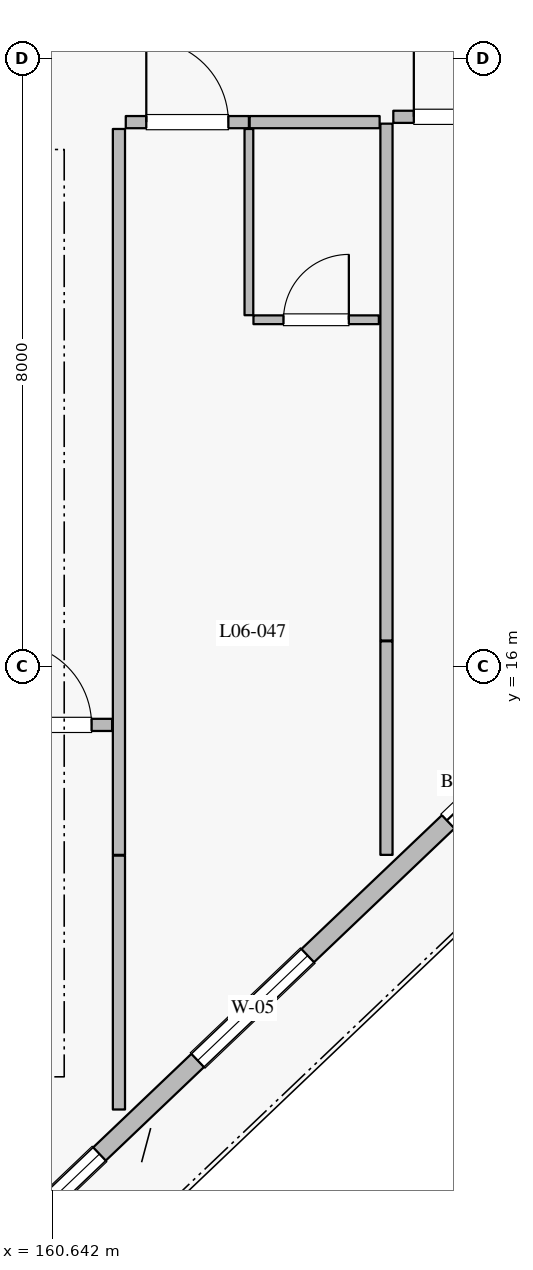
"""IFC4 building model, lengths in metres.
Left out: names, types, materials, properties, quantities, classifications, styles, units other than length and angle.
Written with IfcOpenShell. Run it as: python <this file> out.ifc"""

import sys

from ifc_helpers import new_model, si_unit, direction, frame, frame_2d, origin, place, context, subcontext, project, spatial, rectangle, extrude, element, fill, save


model = new_model("IFC4")
c1 = context("Model", 3, precision=1e-05, world=origin(), true_north=direction((0.0, 1.0)))
c2 = subcontext(c1, "Body", "Model", "MODEL_VIEW")
j1 = project(units=[si_unit("LENGTHUNIT", "METRE"), si_unit("PLANEANGLEUNIT", "RADIAN")], contexts=[c1])
p1 = place(None, origin())
s1 = spatial("IfcSite", under=j1, at=p1, CompositionType="ELEMENT")
p2 = place(p1, origin())
s2 = spatial("IfcBuilding", under=s1, at=p2, CompositionType="ELEMENT")
p3 = place(p2, frame((0.0, 0.0, 28.8)))
s3 = spatial("IfcBuildingStorey", under=s2, at=p3, CompositionType="ELEMENT", Elevation=28.8)
p4 = place(p3, frame((167.65, 15.667, 0.0), z_axis=(0.0, 0.0, 1.0), x_axis=(-0.724105170588, -0.689689569247, 0.0)))
e1 = element("IfcWall", 1, at=p4, inside=s3, PredefinedType="SOLIDWALL", context=c2, shape_type="SweptSolid", body=[
    extrude(rectangle(XDim=10.634, YDim=0.24, at=frame_2d((5.317, 0.0))), origin(), (0.0, 0.0, 1.0), 2.93),
])
p5 = place(p4, frame((0.983, 0.0, 0.0)))
e2 = element("IfcOpeningElement", 2, at=p5, cuts=e1, PredefinedType="OPENING", context=c2, shape_type="SweptSolid", body=[
    extrude(rectangle(XDim=1.5, YDim=2.25, at=frame_2d((0.75, 1.125))), frame((0.0, 0.13, 0.0), z_axis=(0.0, -1.0, 0.0), x_axis=(1.0, 0.0, 0.0)), (0.0, 0.0, 1.0), 0.26),
])
p6 = place(p4, frame((5.035, 0.0, 0.8)))
e3 = element("IfcOpeningElement", 3, at=p6, cuts=e1, PredefinedType="OPENING", context=c2, shape_type="SweptSolid", body=[
    extrude(rectangle(XDim=2.0, YDim=1.75, at=frame_2d((1.0, 0.875))), frame((0.0, 0.13, 0.0), z_axis=(0.0, -1.0, 0.0), x_axis=(1.0, 0.0, 0.0)), (0.0, 0.0, 1.0), 0.26),
])
p7 = place(p4, frame((8.819, 0.0, 0.8)))
e4 = element("IfcOpeningElement", 4, at=p7, cuts=e1, PredefinedType="OPENING", context=c2, shape_type="SweptSolid", body=[
    extrude(rectangle(XDim=1.6, YDim=1.6, at=frame_2d((0.8, 0.8))), frame((0.0, 0.13, 0.0), z_axis=(0.0, -1.0, 0.0), x_axis=(1.0, 0.0, 0.0)), (0.0, 0.0, 1.0), 0.26),
])
p8 = place(p3, frame((159.81, 15.23, 0.0), z_axis=(0.0, 0.0, 1.0), x_axis=(1.0, 0.0, 0.0)))
e5 = element("IfcWall", 5, at=p8, inside=s3, PredefinedType="PARTITIONING", context=c2, shape_type="SweptSolid", body=[
    extrude(rectangle(XDim=1.62, YDim=0.16, at=frame_2d((0.81, 0.0))), origin(), (0.0, 0.0, 1.0), 3.365),
])
p9 = place(p8, frame((0.27, 0.0, 0.0)))
e6 = element("IfcOpeningElement", 6, at=p9, cuts=e5, PredefinedType="OPENING", context=c2, shape_type="SweptSolid", body=[
    extrude(rectangle(XDim=1.08, YDim=2.3, at=frame_2d((0.54, 1.15))), frame((0.0, 0.09, 0.0), z_axis=(0.0, -1.0, 0.0), x_axis=(1.0, 0.0, 0.0)), (0.0, 0.0, 1.0), 0.18),
])
p10 = place(p3, frame((161.52, 10.17, 0.0), z_axis=(0.0, 0.0, 1.0), x_axis=(0.0, 1.0, 0.0)))
e7 = element("IfcWall", 7, at=p10, inside=s3, PredefinedType="PARTITIONING", context=c2, shape_type="SweptSolid", body=[
    extrude(rectangle(XDim=3.34, YDim=0.16, at=frame_2d((1.67, 0.0))), origin(), (0.0, 0.0, 1.0), 3.365),
])
p11 = place(p3, frame((161.61, 23.16, 0.0), z_axis=(0.0, 0.0, 1.0), x_axis=(1.0, 0.0, 0.0)))
e8 = element("IfcWall", 8, at=p11, inside=s3, PredefinedType="PARTITIONING", context=c2, shape_type="SweptSolid", body=[
    extrude(rectangle(XDim=1.62, YDim=0.16, at=frame_2d((0.81, 0.0))), origin(), (0.0, 0.0, 1.0), 3.365),
])
p12 = place(p11, frame((0.27, 0.0, 0.0)))
e9 = element("IfcOpeningElement", 9, at=p12, cuts=e8, PredefinedType="OPENING", context=c2, shape_type="SweptSolid", body=[
    extrude(rectangle(XDim=1.08, YDim=2.3, at=frame_2d((0.54, 1.15))), frame((0.0, 0.09, 0.0), z_axis=(0.0, -1.0, 0.0), x_axis=(1.0, 0.0, 0.0)), (0.0, 0.0, 1.0), 0.18),
])
p13 = place(p3, frame((163.24, 23.16, 0.0), z_axis=(0.0, 0.0, 1.0), x_axis=(1.0, 0.0, 0.0)))
e10 = element("IfcWall", 10, at=p13, inside=s3, PredefinedType="PARTITIONING", context=c2, shape_type="SweptSolid", body=[
    extrude(rectangle(XDim=1.71, YDim=0.16, at=frame_2d((0.855, 0.0))), origin(), (0.0, 0.0, 1.0), 3.365),
])
p14 = place(p3, frame((163.23, 20.62, 0.0), z_axis=(0.0, 0.0, 1.0), x_axis=(0.0, 1.0, 0.0)))
e11 = element("IfcWall", 11, at=p14, inside=s3, PredefinedType="PARTITIONING", context=c2, shape_type="SweptSolid", body=[
    extrude(rectangle(XDim=2.45, YDim=0.115, at=frame_2d((1.225, 0.0))), origin(), (0.0, 0.0, 1.0), 3.365),
])
p15 = place(p3, frame((163.29, 20.56, 0.0), z_axis=(0.0, 0.0, 1.0), x_axis=(1.0, 0.0, 0.0)))
e12 = element("IfcWall", 12, at=p15, inside=s3, PredefinedType="PARTITIONING", context=c2, shape_type="SweptSolid", body=[
    extrude(rectangle(XDim=1.65, YDim=0.115, at=frame_2d((0.825, 0.0))), origin(), (0.0, 0.0, 1.0), 3.365),
])
p16 = place(p15, frame((0.395, 0.0, 0.0)))
e13 = element("IfcOpeningElement", 13, at=p16, cuts=e12, PredefinedType="OPENING", context=c2, shape_type="SweptSolid", body=[
    extrude(rectangle(XDim=0.86, YDim=2.12, at=frame_2d((0.43, 1.06))), frame((0.0, 0.067, 0.0), z_axis=(0.0, -1.0, 0.0), x_axis=(1.0, 0.0, 0.0)), (0.0, 0.0, 1.0), 0.135),
])
p17 = place(p3, frame((161.52, 13.52, 0.0), z_axis=(0.0, 0.0, 1.0), x_axis=(0.0, 1.0, 0.0)))
e14 = element("IfcWall", 14, at=p17, inside=s3, PredefinedType="PARTITIONING", context=c2, shape_type="SweptSolid", body=[
    extrude(rectangle(XDim=9.55, YDim=0.16, at=frame_2d((4.775, 0.0))), origin(), (0.0, 0.0, 1.0), 3.365),
])
p18 = place(p3, frame((165.04, 13.52, 0.0), z_axis=(0.0, 0.0, 1.0), x_axis=(0.0, 1.0, 0.0)))
e15 = element("IfcWall", 15, at=p18, inside=s3, PredefinedType="PARTITIONING", context=c2, shape_type="SweptSolid", body=[
    extrude(rectangle(XDim=2.81, YDim=0.16, at=frame_2d((1.405, 0.0))), origin(), (0.0, 0.0, 1.0), 3.365),
])
p19 = place(p3, frame((165.13, 23.23, 0.0), z_axis=(0.0, 0.0, 1.0), x_axis=(1.0, 0.0, 0.0)))
e16 = element("IfcWall", 16, at=p19, inside=s3, PredefinedType="PARTITIONING", context=c2, shape_type="SweptSolid", body=[
    extrude(rectangle(XDim=1.62, YDim=0.16, at=frame_2d((0.81, 0.0))), origin(), (0.0, 0.0, 1.0), 3.365),
])
p20 = place(p19, frame((0.27, 0.0, 0.0)))
e17 = element("IfcOpeningElement", 17, at=p20, cuts=e16, PredefinedType="OPENING", context=c2, shape_type="SweptSolid", body=[
    extrude(rectangle(XDim=1.08, YDim=2.3, at=frame_2d((0.54, 1.15))), frame((0.0, 0.09, 0.0), z_axis=(0.0, -1.0, 0.0), x_axis=(1.0, 0.0, 0.0)), (0.0, 0.0, 1.0), 0.18),
])
p21 = place(p3, frame((165.04, 16.34, 0.0), z_axis=(0.0, 0.0, 1.0), x_axis=(0.0, 1.0, 0.0)))
e18 = element("IfcWall", 18, at=p21, inside=s3, PredefinedType="PARTITIONING", context=c2, shape_type="SweptSolid", body=[
    extrude(rectangle(XDim=6.8, YDim=0.16, at=frame_2d((3.4, 0.0))), origin(), (0.0, 0.0, 1.0), 3.365),
])
p22 = place(p5, origin())
e19 = element("IfcDoor", 19, at=p22, inside=s3, OperationType="SLIDING_TO_LEFT", PredefinedType="DOOR", context=c2, shape_type="SweptSolid", body=[
    extrude(rectangle(XDim=1.5, YDim=2.25, at=frame_2d((0.75, 1.125))), frame((0.0, 0.025, 0.0), z_axis=(0.0, -1.0, 0.0), x_axis=(1.0, 0.0, 0.0)), (0.0, 0.0, 1.0), 0.05),
])
fill(e2, e19)
p23 = place(p6, origin())
e20 = element("IfcWindow", 20, at=p23, inside=s3, PartitioningType="DOUBLE_PANEL_VERTICAL", PredefinedType="WINDOW", context=c2, shape_type="SweptSolid", body=[
    extrude(rectangle(XDim=2.0, YDim=1.75, at=frame_2d((1.0, 0.875))), frame((0.0, 0.03, 0.0), z_axis=(0.0, -1.0, 0.0), x_axis=(1.0, 0.0, 0.0)), (0.0, 0.0, 1.0), 0.06),
])
fill(e3, e20)
p24 = place(p7, origin())
e21 = element("IfcWindow", 21, at=p24, inside=s3, PartitioningType="SINGLE_PANEL", PredefinedType="WINDOW", context=c2, shape_type="SweptSolid", body=[
    extrude(rectangle(XDim=1.6, YDim=1.6, at=frame_2d((0.8, 0.8))), frame((0.0, 0.03, 0.0), z_axis=(0.0, -1.0, 0.0), x_axis=(1.0, 0.0, 0.0)), (0.0, 0.0, 1.0), 0.06),
])
fill(e4, e21)
p25 = place(p9, origin())
e22 = element("IfcDoor", 22, at=p25, inside=s3, OperationType="SINGLE_SWING_LEFT", PredefinedType="DOOR", context=c2, shape_type="SweptSolid", body=[
    extrude(rectangle(XDim=1.08, YDim=2.3, at=frame_2d((0.54, 1.15))), frame((0.0, 0.025, 0.0), z_axis=(0.0, -1.0, 0.0), x_axis=(1.0, 0.0, 0.0)), (0.0, 0.0, 1.0), 0.05),
])
fill(e6, e22)
p26 = place(p12, origin())
e23 = element("IfcDoor", 23, at=p26, inside=s3, OperationType="SINGLE_SWING_LEFT", PredefinedType="DOOR", context=c2, shape_type="SweptSolid", body=[
    extrude(rectangle(XDim=1.08, YDim=2.3, at=frame_2d((0.54, 1.15))), frame((0.0, 0.025, 0.0), z_axis=(0.0, -1.0, 0.0), x_axis=(1.0, 0.0, 0.0)), (0.0, 0.0, 1.0), 0.05),
])
fill(e9, e23)
p27 = place(p16, origin())
e24 = element("IfcDoor", 24, at=p27, inside=s3, OperationType="SINGLE_SWING_RIGHT", PredefinedType="DOOR", context=c2, shape_type="SweptSolid", body=[
    extrude(rectangle(XDim=0.86, YDim=2.12, at=frame_2d((0.43, 1.06))), frame((0.0, 0.025, 0.0), z_axis=(0.0, -1.0, 0.0), x_axis=(1.0, 0.0, 0.0)), (0.0, 0.0, 1.0), 0.05),
])
fill(e13, e24)
p28 = place(p20, origin())
e25 = element("IfcDoor", 25, at=p28, inside=s3, OperationType="SINGLE_SWING_LEFT", PredefinedType="DOOR", context=c2, shape_type="SweptSolid", body=[
    extrude(rectangle(XDim=1.08, YDim=2.3, at=frame_2d((0.54, 1.15))), frame((0.0, 0.025, 0.0), z_axis=(0.0, -1.0, 0.0), x_axis=(1.0, 0.0, 0.0)), (0.0, 0.0, 1.0), 0.05),
])
fill(e17, e25)
save(model, sys.argv[1])
